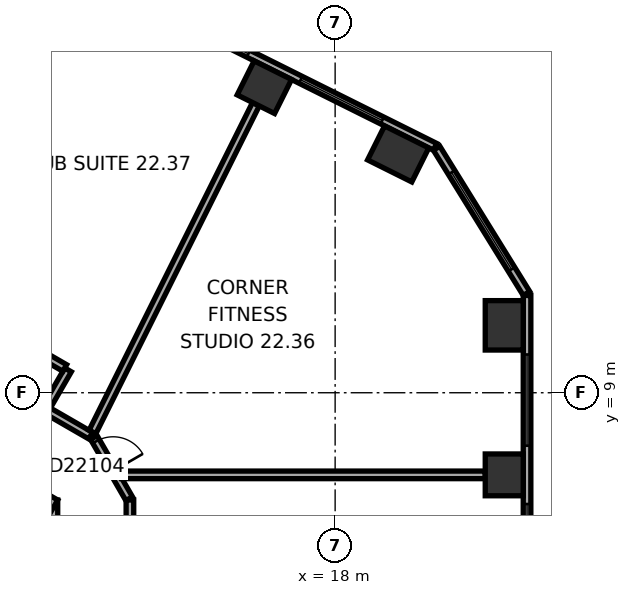
"""IFC4 building model, lengths in metres.
Left out: names, types, materials, properties, quantities, classifications, styles, units other than length and angle.
Written with IfcOpenShell. Run it as: python <this file> out.ifc"""

import sys

from ifc_helpers import new_model, si_unit, direction, frame, frame_2d, origin, origin_2d, place, context, subcontext, project, spatial, rectangle, extrude, element, fill, save


model = new_model("IFC4")
c1 = context("Model", 3, precision=1e-05, world=origin(), true_north=direction((0.0, 1.0)))
c2 = subcontext(c1, "Body", "Model", "MODEL_VIEW")
j1 = project(units=[si_unit("LENGTHUNIT", "METRE"), si_unit("PLANEANGLEUNIT", "RADIAN")], contexts=[c1])
p1 = place(None, origin())
s1 = spatial("IfcSite", under=j1, at=p1, CompositionType="ELEMENT")
p2 = place(p1, origin())
s2 = spatial("IfcBuilding", under=s1, at=p2, CompositionType="ELEMENT")
p3 = place(p2, frame((0.0, 0.0, 96.8)))
s3 = spatial("IfcBuildingStorey", under=s2, at=p3, CompositionType="ELEMENT", Elevation=96.8)
p4 = place(p3, frame((22.45, 6.839, 0.0), z_axis=(0.0, 0.0, 1.0), x_axis=(0.0, 1.0, 0.0)))
e1 = element("IfcColumn", 1, at=p4, inside=s3, PredefinedType="COLUMN", context=c2, shape_type="SweptSolid", body=[
    extrude(rectangle(XDim=1.1, YDim=1.0, at=origin_2d()), origin(), (0.0, 0.0, 1.0), 3.3),
])
for number, where, z_axis, x_axis in (
    (2, (22.45, 10.774, 0.0), (0.0, 0.0, 1.0), (0.0, 1.0, 0.0)),
    (3, (19.659, 15.284, 0.0), (0.0, 0.0, 1.0), (-0.895, 0.446, 0.0)),
):
    element("IfcColumn", number, at=place(p3, frame(where, z_axis=z_axis, x_axis=x_axis)), inside=s3, PredefinedType="COLUMN", context=c2, shape_type="SweptSolid", body=[
        extrude(rectangle(XDim=1.3, YDim=1.0, at=origin_2d()), origin(), (0.0, 0.0, 1.0), 3.3),
    ])
p5 = place(p3, frame((16.138, 17.04, 0.0), z_axis=(0.0, 0.0, 1.0), x_axis=(-0.894934361602, 0.44619781311, 0.0)))
e4 = element("IfcColumn", 4, at=p5, inside=s3, PredefinedType="COLUMN", context=c2, shape_type="SweptSolid", body=[
    extrude(rectangle(XDim=1.1, YDim=1.0, at=origin_2d()), origin(), (0.0, 0.0, 1.0), 3.3),
])
p6 = place(p3, frame((10.1, -6.177, 0.0), z_axis=(0.0, 0.0, 1.0), x_axis=(0.0, 1.0, 0.0)))
e5 = element("IfcWall", 5, at=p6, inside=s3, PredefinedType="SHEAR", context=c2, shape_type="SweptSolid", body=[
    extrude(rectangle(XDim=12.355, YDim=1.2, at=frame_2d((6.177, 0.0))), origin(), (0.0, 0.0, 1.0), 3.3),
])
p7 = place(p6, frame((6.378, 0.0, 0.0)))
e6 = element("IfcOpeningElement", 6, at=p7, cuts=e5, PredefinedType="OPENING", context=c2, shape_type="SweptSolid", body=[
    extrude(rectangle(XDim=1.5, YDim=2.1, at=frame_2d((0.75, 1.05))), frame((0.0, 0.61, 0.0), z_axis=(0.0, -1.0, 0.0), x_axis=(1.0, 0.0, 0.0)), (0.0, 0.0, 1.0), 1.22),
])
p8 = place(p6, frame((1.828, 0.0, 0.0)))
e7 = element("IfcOpeningElement", 7, at=p8, cuts=e5, PredefinedType="OPENING", context=c2, shape_type="SweptSolid", body=[
    extrude(rectangle(XDim=1.1, YDim=2.1, at=frame_2d((0.55, 1.05))), frame((0.0, 0.61, 0.0), z_axis=(0.0, -1.0, 0.0), x_axis=(1.0, 0.0, 0.0)), (0.0, 0.0, 1.0), 1.22),
])
p9 = place(p6, frame((4.427, 0.0, 0.0)))
e8 = element("IfcOpeningElement", 8, at=p9, cuts=e5, PredefinedType="OPENING", context=c2, shape_type="SweptSolid", body=[
    extrude(rectangle(XDim=1.1, YDim=2.1, at=frame_2d((0.55, 1.05))), frame((0.0, 0.61, 0.0), z_axis=(0.0, -1.0, 0.0), x_axis=(1.0, 0.0, 0.0)), (0.0, 0.0, 1.0), 1.22),
])
p10 = place(p3, frame((10.4, 5.658, 0.0), z_axis=(0.0, 0.0, 1.0), x_axis=(-0.866021384402, 0.500006961711, 0.0)))
e9 = element("IfcWall", 9, at=p10, inside=s3, PredefinedType="SHEAR", context=c2, shape_type="SweptSolid", body=[
    extrude(rectangle(XDim=12.355, YDim=1.2, at=frame_2d((6.178, 0.0))), origin(), (0.0, 0.0, 1.0), 3.3),
])
p11 = place(p10, frame((2.728, 0.0, 0.0)))
e10 = element("IfcOpeningElement", 10, at=p11, cuts=e9, PredefinedType="OPENING", context=c2, shape_type="SweptSolid", body=[
    extrude(rectangle(XDim=1.1, YDim=2.1, at=frame_2d((0.55, 1.05))), frame((0.0, 0.61, 0.0), z_axis=(0.0, -1.0, 0.0), x_axis=(1.0, 0.0, 0.0)), (0.0, 0.0, 1.0), 1.22),
])
p12 = place(p10, frame((5.328, 0.0, 0.0)))
e11 = element("IfcOpeningElement", 11, at=p12, cuts=e9, PredefinedType="OPENING", context=c2, shape_type="SweptSolid", body=[
    extrude(rectangle(XDim=1.1, YDim=2.1, at=frame_2d((0.55, 1.05))), frame((0.0, 0.61, 0.0), z_axis=(0.0, -1.0, 0.0), x_axis=(1.0, 0.0, 0.0)), (0.0, 0.0, 1.0), 1.22),
])
p13 = place(p10, frame((7.928, 0.0, 0.0)))
e12 = element("IfcOpeningElement", 12, at=p13, cuts=e9, PredefinedType="OPENING", context=c2, shape_type="SweptSolid", body=[
    extrude(rectangle(XDim=1.1, YDim=2.1, at=frame_2d((0.55, 1.05))), frame((0.0, 0.61, 0.0), z_axis=(0.0, -1.0, 0.0), x_axis=(1.0, 0.0, 0.0)), (0.0, 0.0, 1.0), 1.22),
])
p14 = place(p3, frame((23.05, -9.687, 0.0), z_axis=(0.0, 0.0, 1.0), x_axis=(0.0, 1.0, 0.0)))
e13 = element("IfcWall", 13, at=p14, inside=s3, PredefinedType="STANDARD", context=c2, shape_type="SweptSolid", body=[
    extrude(rectangle(XDim=21.246, YDim=0.2, at=frame_2d((10.623, 0.0))), origin(), (0.0, 0.0, 1.0), 3.3),
])
p15 = place(p14, frame((1.555, 0.0, 0.8)))
e14 = element("IfcOpeningElement", 14, at=p15, cuts=e13, PredefinedType="OPENING", context=c2, shape_type="SweptSolid", body=[
    extrude(rectangle(XDim=2.4, YDim=1.7, at=frame_2d((1.2, 0.85))), frame((0.0, 0.11, 0.0), z_axis=(0.0, -1.0, 0.0), x_axis=(1.0, 0.0, 0.0)), (0.0, 0.0, 1.0), 0.22),
])
p16 = place(p14, frame((5.489, 0.0, 0.8)))
e15 = element("IfcOpeningElement", 15, at=p16, cuts=e13, PredefinedType="OPENING", context=c2, shape_type="SweptSolid", body=[
    extrude(rectangle(XDim=2.4, YDim=1.7, at=frame_2d((1.2, 0.85))), frame((0.0, 0.11, 0.0), z_axis=(0.0, -1.0, 0.0), x_axis=(1.0, 0.0, 0.0)), (0.0, 0.0, 1.0), 0.22),
])
p17 = place(p14, frame((9.424, 0.0, 0.8)))
e16 = element("IfcOpeningElement", 16, at=p17, cuts=e13, PredefinedType="OPENING", context=c2, shape_type="SweptSolid", body=[
    extrude(rectangle(XDim=2.4, YDim=1.7, at=frame_2d((1.2, 0.85))), frame((0.0, 0.11, 0.0), z_axis=(0.0, -1.0, 0.0), x_axis=(1.0, 0.0, 0.0)), (0.0, 0.0, 1.0), 0.22),
])
p18 = place(p14, frame((13.358, 0.0, 0.8)))
e17 = element("IfcOpeningElement", 17, at=p18, cuts=e13, PredefinedType="OPENING", context=c2, shape_type="SweptSolid", body=[
    extrude(rectangle(XDim=2.4, YDim=1.7, at=frame_2d((1.2, 0.85))), frame((0.0, 0.11, 0.0), z_axis=(0.0, -1.0, 0.0), x_axis=(1.0, 0.0, 0.0)), (0.0, 0.0, 1.0), 0.22),
])
p19 = place(p14, frame((17.293, 0.0, 0.8)))
e18 = element("IfcOpeningElement", 18, at=p19, cuts=e13, PredefinedType="OPENING", context=c2, shape_type="SweptSolid", body=[
    extrude(rectangle(XDim=2.4, YDim=1.7, at=frame_2d((1.2, 0.85))), frame((0.0, 0.11, 0.0), z_axis=(0.0, -1.0, 0.0), x_axis=(1.0, 0.0, 0.0)), (0.0, 0.0, 1.0), 0.22),
])
p20 = place(p3, frame((23.035, 11.612, 0.0), z_axis=(0.0, 0.0, 1.0), x_axis=(-0.526160091227, 0.850385535155, 0.0)))
e19 = element("IfcWall", 19, at=p20, inside=s3, PredefinedType="STANDARD", context=c2, shape_type="SweptSolid", body=[
    extrude(rectangle(XDim=4.494, YDim=0.2, at=frame_2d((2.247, 0.0))), origin(), (0.0, 0.0, 1.0), 3.3),
])
p21 = place(p20, frame((0.747, 0.0, 0.8)))
e20 = element("IfcOpeningElement", 20, at=p21, cuts=e19, PredefinedType="OPENING", context=c2, shape_type="SweptSolid", body=[
    extrude(rectangle(XDim=3.0, YDim=1.7, at=frame_2d((1.5, 0.85))), frame((0.0, 0.11, 0.0), z_axis=(0.0, -1.0, 0.0), x_axis=(1.0, 0.0, 0.0)), (0.0, 0.0, 1.0), 0.22),
])
p22 = place(p3, frame((20.63, 15.47, 0.0), z_axis=(0.0, 0.0, 1.0), x_axis=(-0.894934518609, 0.446197498203, 0.0)))
e21 = element("IfcWall", 21, at=p22, inside=s3, PredefinedType="STANDARD", context=c2, shape_type="SweptSolid", body=[
    extrude(rectangle(XDim=21.246, YDim=0.2, at=frame_2d((10.623, 0.0))), origin(), (0.0, 0.0, 1.0), 3.3),
])
p23 = place(p22, frame((1.553, 0.0, 0.8)))
e22 = element("IfcOpeningElement", 22, at=p23, cuts=e21, PredefinedType="OPENING", context=c2, shape_type="SweptSolid", body=[
    extrude(rectangle(XDim=2.4, YDim=1.7, at=frame_2d((1.2, 0.85))), frame((0.0, 0.11, 0.0), z_axis=(0.0, -1.0, 0.0), x_axis=(1.0, 0.0, 0.0)), (0.0, 0.0, 1.0), 0.22),
])
p24 = place(p22, frame((5.488, 0.0, 0.8)))
e23 = element("IfcOpeningElement", 23, at=p24, cuts=e21, PredefinedType="OPENING", context=c2, shape_type="SweptSolid", body=[
    extrude(rectangle(XDim=2.4, YDim=1.7, at=frame_2d((1.2, 0.85))), frame((0.0, 0.11, 0.0), z_axis=(0.0, -1.0, 0.0), x_axis=(1.0, 0.0, 0.0)), (0.0, 0.0, 1.0), 0.22),
])
p25 = place(p22, frame((9.422, 0.0, 0.8)))
e24 = element("IfcOpeningElement", 24, at=p25, cuts=e21, PredefinedType="OPENING", context=c2, shape_type="SweptSolid", body=[
    extrude(rectangle(XDim=2.4, YDim=1.7, at=frame_2d((1.2, 0.85))), frame((0.0, 0.11, 0.0), z_axis=(0.0, -1.0, 0.0), x_axis=(1.0, 0.0, 0.0)), (0.0, 0.0, 1.0), 0.22),
])
p26 = place(p22, frame((13.357, 0.0, 0.8)))
e25 = element("IfcOpeningElement", 25, at=p26, cuts=e21, PredefinedType="OPENING", context=c2, shape_type="SweptSolid", body=[
    extrude(rectangle(XDim=2.4, YDim=1.7, at=frame_2d((1.2, 0.85))), frame((0.0, 0.11, 0.0), z_axis=(0.0, -1.0, 0.0), x_axis=(1.0, 0.0, 0.0)), (0.0, 0.0, 1.0), 0.22),
])
p27 = place(p22, frame((17.292, 0.0, 0.8)))
e26 = element("IfcOpeningElement", 26, at=p27, cuts=e21, PredefinedType="OPENING", context=c2, shape_type="SweptSolid", body=[
    extrude(rectangle(XDim=2.4, YDim=1.7, at=frame_2d((1.2, 0.85))), frame((0.0, 0.11, 0.0), z_axis=(0.0, -1.0, 0.0), x_axis=(1.0, 0.0, 0.0)), (0.0, 0.0, 1.0), 0.22),
])
p28 = place(p3, frame((10.371, 8.561, 0.0), z_axis=(0.0, 0.0, 1.0), x_axis=(0.499986357472, 0.866033280158, 0.0)))
e27 = element("IfcWall", 27, at=p28, inside=s3, PredefinedType="PARTITIONING", context=c2, shape_type="SweptSolid", body=[
    extrude(rectangle(XDim=1.201, YDim=0.2, at=frame_2d((0.601, 0.0))), origin(), (0.0, 0.0, 1.0), 3.05),
])
p29 = place(p3, frame((10.885, 9.652, 0.0), z_axis=(0.0, 0.0, 1.0), x_axis=(-0.866033630405, 0.499985750804, 0.0)))
e28 = element("IfcWall", 28, at=p29, inside=s3, PredefinedType="PARTITIONING", context=c2, shape_type="SweptSolid", body=[
    extrude(rectangle(XDim=8.642, YDim=0.2, at=frame_2d((4.321, 0.0))), origin(), (0.0, 0.0, 1.0), 3.05),
])
p30 = place(p29, frame((2.276, 0.0, 0.0)))
e29 = element("IfcOpeningElement", 29, at=p30, cuts=e28, PredefinedType="OPENING", context=c2, shape_type="SweptSolid", body=[
    extrude(rectangle(XDim=0.9, YDim=2.1, at=frame_2d((0.45, 1.05))), frame((0.0, 0.11, 0.0), z_axis=(0.0, -1.0, 0.0), x_axis=(1.0, 0.0, 0.0)), (0.0, 0.0, 1.0), 0.22),
])
p31 = place(p3, frame((11.566, 7.871, 0.0), z_axis=(0.0, 0.0, 1.0), x_axis=(-0.866004557827, 0.500036104519, 0.0)))
e30 = element("IfcWall", 30, at=p31, inside=s3, PredefinedType="PARTITIONING", context=c2, shape_type="SweptSolid", body=[
    extrude(rectangle(XDim=1.28, YDim=0.2, at=frame_2d((0.64, 0.0))), origin(), (0.0, 0.0, 1.0), 3.05),
])
p32 = place(p3, frame((12.58, 6.212, 0.0), z_axis=(0.0, 0.0, 1.0), x_axis=(-0.500063286585, 0.865988862174, 0.0)))
e31 = element("IfcWall", 31, at=p32, inside=s3, PredefinedType="PARTITIONING", context=c2, shape_type="SweptSolid", body=[
    extrude(rectangle(XDim=1.86, YDim=0.2, at=frame_2d((0.93, 0.0))), origin(), (0.0, 0.0, 1.0), 3.05),
])
p33 = place(p32, frame((0.842, 0.0, 0.0)))
e32 = element("IfcOpeningElement", 32, at=p33, cuts=e31, PredefinedType="OPENING", context=c2, shape_type="SweptSolid", body=[
    extrude(rectangle(XDim=0.9, YDim=2.1, at=frame_2d((0.45, 1.05))), frame((0.0, 0.11, 0.0), z_axis=(0.0, -1.0, 0.0), x_axis=(1.0, 0.0, 0.0)), (0.0, 0.0, 1.0), 0.22),
])
p34 = place(p3, frame((12.6, 3.004, 0.0), z_axis=(0.0, 0.0, 1.0), x_axis=(0.0, 1.0, 0.0)))
e33 = element("IfcWall", 33, at=p34, inside=s3, PredefinedType="PARTITIONING", context=c2, shape_type="SweptSolid", body=[
    extrude(rectangle(XDim=3.173, YDim=0.2, at=frame_2d((1.586, 0.0))), origin(), (0.0, 0.0, 1.0), 3.05),
])
p35 = place(p34, frame((1.136, 0.0, 0.0)))
e34 = element("IfcOpeningElement", 34, at=p35, cuts=e33, PredefinedType="OPENING", context=c2, shape_type="SweptSolid", body=[
    extrude(rectangle(XDim=0.9, YDim=2.1, at=frame_2d((0.45, 1.05))), frame((0.0, 0.11, 0.0), z_axis=(0.0, -1.0, 0.0), x_axis=(1.0, 0.0, 0.0)), (0.0, 0.0, 1.0), 0.22),
])
p36 = place(p3, frame((15.915, 16.592, 0.0), z_axis=(0.0, 0.0, 1.0), x_axis=(-0.446199736347, -0.894933402709, 0.0)))
e35 = element("IfcWall", 35, at=p36, inside=s3, PredefinedType="PARTITIONING", context=c2, shape_type="SweptSolid", body=[
    extrude(rectangle(XDim=9.635, YDim=0.2, at=frame_2d((4.817, 0.0))), origin(), (0.0, 0.0, 1.0), 3.05),
])
p37 = place(p3, frame((21.95, 6.839, 0.0), z_axis=(0.0, 0.0, 1.0), x_axis=(-1.0, 0.0, 0.0)))
e36 = element("IfcWall", 36, at=p37, inside=s3, PredefinedType="PARTITIONING", context=c2, shape_type="SweptSolid", body=[
    extrude(rectangle(XDim=9.572, YDim=0.2, at=frame_2d((4.786, 0.0))), origin(), (0.0, 0.0, 1.0), 3.05),
])
p38 = place(p18, origin())
e37 = element("IfcWindow", 37, at=p38, inside=s3, PartitioningType="SINGLE_PANEL", PredefinedType="WINDOW", context=c2, shape_type="SweptSolid", body=[
    extrude(rectangle(XDim=2.4, YDim=1.7, at=frame_2d((1.2, 0.85))), frame((0.0, 0.03, 0.0), z_axis=(0.0, -1.0, 0.0), x_axis=(1.0, 0.0, 0.0)), (0.0, 0.0, 1.0), 0.06),
])
fill(e17, e37)
p39 = place(p19, origin())
e38 = element("IfcWindow", 38, at=p39, inside=s3, PartitioningType="SINGLE_PANEL", PredefinedType="WINDOW", context=c2, shape_type="SweptSolid", body=[
    extrude(rectangle(XDim=2.4, YDim=1.7, at=frame_2d((1.2, 0.85))), frame((0.0, 0.03, 0.0), z_axis=(0.0, -1.0, 0.0), x_axis=(1.0, 0.0, 0.0)), (0.0, 0.0, 1.0), 0.06),
])
fill(e18, e38)
p40 = place(p21, origin())
e39 = element("IfcWindow", 39, at=p40, inside=s3, PartitioningType="SINGLE_PANEL", PredefinedType="WINDOW", context=c2, shape_type="SweptSolid", body=[
    extrude(rectangle(XDim=3.0, YDim=1.7, at=frame_2d((1.5, 0.85))), frame((0.0, 0.03, 0.0), z_axis=(0.0, -1.0, 0.0), x_axis=(1.0, 0.0, 0.0)), (0.0, 0.0, 1.0), 0.06),
])
fill(e20, e39)
p41 = place(p23, origin())
e40 = element("IfcWindow", 40, at=p41, inside=s3, PartitioningType="SINGLE_PANEL", PredefinedType="WINDOW", context=c2, shape_type="SweptSolid", body=[
    extrude(rectangle(XDim=2.4, YDim=1.7, at=frame_2d((1.2, 0.85))), frame((0.0, 0.03, 0.0), z_axis=(0.0, -1.0, 0.0), x_axis=(1.0, 0.0, 0.0)), (0.0, 0.0, 1.0), 0.06),
])
fill(e22, e40)
p42 = place(p24, origin())
e41 = element("IfcWindow", 41, at=p42, inside=s3, PartitioningType="SINGLE_PANEL", PredefinedType="WINDOW", context=c2, shape_type="SweptSolid", body=[
    extrude(rectangle(XDim=2.4, YDim=1.7, at=frame_2d((1.2, 0.85))), frame((0.0, 0.03, 0.0), z_axis=(0.0, -1.0, 0.0), x_axis=(1.0, 0.0, 0.0)), (0.0, 0.0, 1.0), 0.06),
])
fill(e23, e41)
p43 = place(p33, origin())
e42 = element("IfcDoor", 42, at=p43, inside=s3, OperationType="SINGLE_SWING_LEFT", PredefinedType="DOOR", context=c2, shape_type="SweptSolid", body=[
    extrude(rectangle(XDim=0.9, YDim=2.1, at=frame_2d((0.45, 1.05))), frame((0.0, 0.025, 0.0), z_axis=(0.0, -1.0, 0.0), x_axis=(1.0, 0.0, 0.0)), (0.0, 0.0, 1.0), 0.05),
])
fill(e32, e42)
save(model, sys.argv[1])
